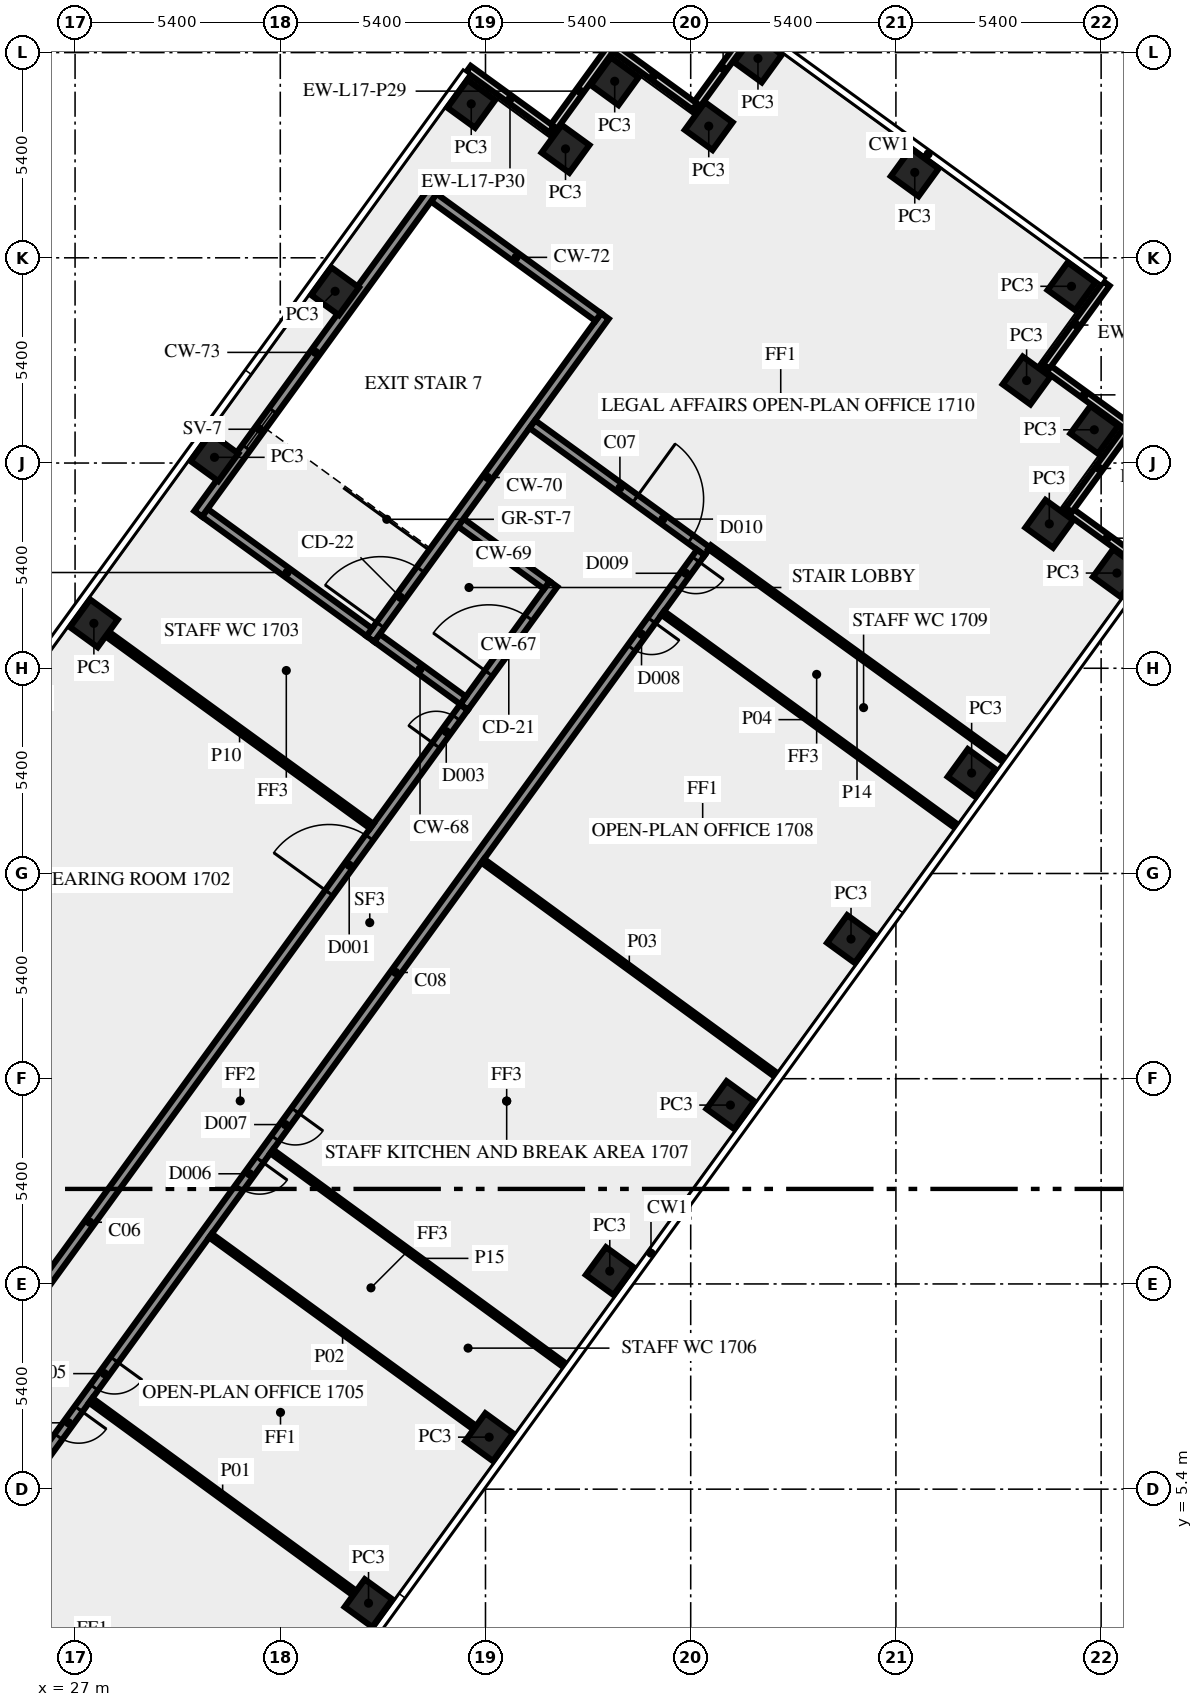
"""IFC4 building model, lengths in metres.
Left out: names, types, materials, properties, quantities, classifications, styles, units other than length and angle.
Written with IfcOpenShell. Run it as: python <this file> out.ifc"""

import sys

from ifc_helpers import new_model, si_unit, direction, frame, frame_2d, origin, origin_2d, place, context, subcontext, project, spatial, rectangle, extrude, element, fill, save


model = new_model("IFC4")
c1 = context("Model", 3, precision=1e-05, world=origin(), true_north=direction((0.0, 1.0)))
c2 = subcontext(c1, "Body", "Model", "MODEL_VIEW")
j1 = project(units=[si_unit("LENGTHUNIT", "METRE"), si_unit("PLANEANGLEUNIT", "RADIAN")], contexts=[c1])
p1 = place(None, origin())
s1 = spatial("IfcSite", under=j1, at=p1, CompositionType="ELEMENT")
p2 = place(p1, origin())
s2 = spatial("IfcBuilding", under=s1, at=p2, CompositionType="ELEMENT")
p3 = place(p2, frame((0.0, 0.0, 75.0)))
s3 = spatial("IfcBuildingStorey", under=s2, at=p3, CompositionType="ELEMENT", Elevation=75.0)
for number, where, z_axis, x_axis in (
    (1, (34.722, 2.4, 0.0), (0.0, 0.0, 1.0), (0.588, 0.809, 0.0)),
    (2, (37.896, 6.769, 0.0), (0.0, 0.0, 1.0), (0.588, 0.809, 0.0)),
    (3, (41.07, 11.137, 0.0), (0.0, 0.0, 1.0), (0.588, 0.809, 0.0)),
    (4, (44.244, 15.506, 0.0), (0.0, 0.0, 1.0), (0.588, 0.809, 0.0)),
    (5, (47.418, 19.875, 0.0), (0.0, 0.0, 1.0), (0.588, 0.809, 0.0)),
    (6, (50.592, 24.243, 0.0), (0.0, 0.0, 1.0), (0.588, 0.809, 0.0)),
    (7, (54.415, 29.505, 0.0), (0.0, 0.0, 1.0), (0.588, 0.809, 0.0)),
    (8, (52.636, 30.8, 0.0), (0.0, 0.0, 1.0), (-0.809, 0.588, 0.0)),
    (9, (53.82, 33.275, 0.0), (0.0, 0.0, 1.0), (-0.809, 0.588, 0.0)),
    (10, (52.039, 34.571, 0.0), (0.0, 0.0, 1.0), (0.588, 0.809, 0.0)),
    (11, (53.22, 37.05, 0.0), (0.0, 0.0, 1.0), (-0.809, 0.588, 0.0)),
    (12, (49.096, 40.047, 0.0), (0.0, 0.0, 1.0), (-0.809, 0.588, 0.0)),
    (13, (44.97, 43.045, 0.0), (0.0, 0.0, 1.0), (-0.809, 0.588, 0.0)),
    (14, (43.675, 41.265, 0.0), (0.0, 0.0, 1.0), (-0.809, 0.588, 0.0)),
    (15, (41.2, 42.445, 0.0), (0.0, 0.0, 1.0), (-0.588, -0.809, 0.0)),
    (16, (39.906, 40.666, 0.0), (0.0, 0.0, 1.0), (-0.588, -0.809, 0.0)),
    (17, (37.425, 41.85, 0.0), (0.0, 0.0, 1.0), (-0.588, -0.809, 0.0)),
    (18, (33.843, 36.919, 0.0), (0.0, 0.0, 1.0), (-0.588, -0.809, 0.0)),
    (19, (30.669, 32.55, 0.0), (0.0, 0.0, 1.0), (-0.588, -0.809, 0.0)),
    (20, (27.495, 28.181, 0.0), (0.0, 0.0, 1.0), (-0.588, -0.809, 0.0)),
):
    element("IfcColumn", number, at=place(p3, frame(where, z_axis=z_axis, x_axis=x_axis)), inside=s3, PredefinedType="COLUMN", context=c2, shape_type="SweptSolid", body=[
        extrude(rectangle(XDim=0.9, YDim=0.9, at=origin_2d()), origin(), (0.0, 0.0, 1.0), 3.4),
    ])
p4 = place(p3, frame((55.247, 29.629, 0.0), z_axis=(0.0, 0.0, 1.0), x_axis=(-0.809033161865, 0.587762999008, 0.0)))
e21 = element("IfcWall", 21, at=p4, inside=s3, PredefinedType="SOLIDWALL", context=c2, shape_type="SweptSolid", body=[
    extrude(rectangle(XDim=2.7, YDim=0.2, at=frame_2d((1.35, 0.0))), origin(), (0.0, 0.0, 1.0), 3.4),
])
p5 = place(p3, frame((53.151, 31.167, 0.0), z_axis=(0.0, 0.0, 1.0), x_axis=(0.587779184282, 0.809021403008, 0.0)))
e22 = element("IfcWall", 22, at=p5, inside=s3, PredefinedType="SOLIDWALL", context=c2, shape_type="SweptSolid", body=[
    extrude(rectangle(XDim=2.7, YDim=0.2, at=frame_2d((1.35, 0.0))), origin(), (0.0, 0.0, 1.0), 3.4),
])
for number, where, z_axis, x_axis in (
    (23, (54.65, 33.4, 0.0), (0.0, 0.0, 1.0), (-0.809, 0.588, 0.0)),
    (24, (52.553, 34.938, 0.0), (0.0, 0.0, 1.0), (0.588, 0.809, 0.0)),
    (25, (44.846, 43.875, 0.0), (0.0, 0.0, 1.0), (-0.588, -0.809, 0.0)),
    (26, (43.308, 41.779, 0.0), (0.0, 0.0, 1.0), (-0.809, 0.588, 0.0)),
):
    element("IfcWall", number, at=place(p3, frame(where, z_axis=z_axis, x_axis=x_axis)), inside=s3, PredefinedType="SOLIDWALL", context=c2, shape_type="SweptSolid", body=[
        extrude(rectangle(XDim=2.7, YDim=0.2, at=frame_2d((1.35, 0.0))), origin(), (0.0, 0.0, 1.0), 3.4),
    ])
p6 = place(p3, frame((41.075, 43.278, 0.0), z_axis=(0.0, 0.0, 1.0), x_axis=(-0.587806000234, -0.809001919707, 0.0)))
e27 = element("IfcWall", 27, at=p6, inside=s3, PredefinedType="SOLIDWALL", context=c2, shape_type="SweptSolid", body=[
    extrude(rectangle(XDim=2.7, YDim=0.2, at=frame_2d((1.35, 0.0))), origin(), (0.0, 0.0, 1.0), 3.4),
])
p7 = place(p3, frame((39.537, 41.181, 0.0), z_axis=(0.0, 0.0, 1.0), x_axis=(-0.809033161865, 0.587762999008, 0.0)))
e28 = element("IfcWall", 28, at=p7, inside=s3, PredefinedType="SOLIDWALL", context=c2, shape_type="SweptSolid", body=[
    extrude(rectangle(XDim=2.7, YDim=0.2, at=frame_2d((1.35, 0.0))), origin(), (0.0, 0.0, 1.0), 3.4),
])
p8 = place(p3, frame((37.238, 25.98, 0.0), z_axis=(0.0, 0.0, 1.0), x_axis=(0.587772420479, 0.809026317077, 0.0)))
e29 = element("IfcWall", 29, at=p8, inside=s3, PredefinedType="SHEAR", context=c2, shape_type="SweptSolid", body=[
    extrude(rectangle(XDim=4.0, YDim=0.25, at=frame_2d((2.0, 0.0))), origin(), (0.0, 0.0, 1.0), 3.4),
])
p9 = place(p8, frame((1.1, 0.0, 0.0)))
e30 = element("IfcOpeningElement", 30, at=p9, cuts=e29, PredefinedType="OPENING", context=c2, shape_type="SweptSolid", body=[
    extrude(rectangle(XDim=1.8, YDim=2.1, at=frame_2d((0.9, 1.05))), frame((0.0, 0.135, 0.0), z_axis=(0.0, -1.0, 0.0), x_axis=(1.0, 0.0, 0.0)), (0.0, 0.0, 1.0), 0.27),
])
for number, where, z_axis, x_axis in (
    (31, (37.21, 26.154, 0.0), (0.0, 0.0, 1.0), (-0.809, 0.588, 0.0)),
    (32, (39.414, 29.188, 0.0), (0.0, 0.0, 1.0), (-0.809, 0.588, 0.0)),
):
    element("IfcWall", number, at=place(p3, frame(where, z_axis=z_axis, x_axis=x_axis)), inside=s3, PredefinedType="SHEAR", context=c2, shape_type="SweptSolid", body=[
        extrude(rectangle(XDim=2.8, YDim=0.25, at=frame_2d((1.4, 0.0))), origin(), (0.0, 0.0, 1.0), 3.4),
    ])
p10 = place(p3, frame((34.77, 27.772, 0.0), z_axis=(0.0, 0.0, 1.0), x_axis=(0.587795589702, 0.809009483706, 0.0)))
e33 = element("IfcWall", 33, at=p10, inside=s3, PredefinedType="SHEAR", context=c2, shape_type="SweptSolid", body=[
    extrude(rectangle(XDim=10.5, YDim=0.25, at=frame_2d((5.25, 0.0))), origin(), (0.0, 0.0, 1.0), 3.4),
])
p11 = place(p10, frame((0.45, 0.0, 0.0)))
e34 = element("IfcOpeningElement", 34, at=p11, cuts=e33, PredefinedType="OPENING", context=c2, shape_type="SweptSolid", body=[
    extrude(rectangle(XDim=1.8, YDim=2.1, at=frame_2d((0.9, 1.05))), frame((0.0, 0.135, 0.0), z_axis=(0.0, -1.0, 0.0), x_axis=(1.0, 0.0, 0.0)), (0.0, 0.0, 1.0), 0.27),
])
p12 = place(p3, frame((34.742, 27.947, 0.0), z_axis=(0.0, 0.0, 1.0), x_axis=(-0.8089984606, 0.587810760999, 0.0)))
e35 = element("IfcWall", 35, at=p12, inside=s3, PredefinedType="SHEAR", context=c2, shape_type="SweptSolid", body=[
    extrude(rectangle(XDim=5.35, YDim=0.25, at=frame_2d((2.675, 0.0))), origin(), (0.0, 0.0, 1.0), 3.4),
])
p13 = place(p3, frame((40.767, 36.24, 0.0), z_axis=(0.0, 0.0, 1.0), x_axis=(-0.809020161303, 0.587780893365, 0.0)))
e36 = element("IfcWall", 36, at=p13, inside=s3, PredefinedType="SHEAR", context=c2, shape_type="SweptSolid", body=[
    extrude(rectangle(XDim=5.35, YDim=0.25, at=frame_2d((2.675, 0.0))), origin(), (0.0, 0.0, 1.0), 3.4),
])
p14 = place(p3, frame((30.24, 31.064, 0.0), z_axis=(0.0, 0.0, 1.0), x_axis=(0.587795589702, 0.809009483706, 0.0)))
e37 = element("IfcWall", 37, at=p14, inside=s3, PredefinedType="SHEAR", context=c2, shape_type="SweptSolid", body=[
    extrude(rectangle(XDim=10.5, YDim=0.25, at=frame_2d((5.25, 0.0))), origin(), (0.0, 0.0, 1.0), 3.4),
])
p15 = place(p14, frame((2.15, 0.0, 1.0)))
e38 = element("IfcOpeningElement", 38, at=p15, cuts=e37, PredefinedType="OPENING", context=c2, shape_type="SweptSolid", body=[
    extrude(rectangle(XDim=1.2, YDim=1.2, at=frame_2d((0.6, 0.6))), frame((0.0, 0.135, 0.0), z_axis=(0.0, -1.0, 0.0), x_axis=(1.0, 0.0, 0.0)), (0.0, 0.0, 1.0), 0.27),
])
p16 = place(p3, frame((17.545, -1.125, 0.0), z_axis=(0.0, 0.0, 1.0), x_axis=(0.587786323093, 0.809016216391, 0.0)))
e39 = element("IfcWall", 39, at=p16, inside=s3, PredefinedType="SOLIDWALL", context=c2, shape_type="SweptSolid", body=[
    extrude(rectangle(XDim=33.493, YDim=0.25, at=frame_2d((16.747, 0.0))), origin(), (0.0, 0.0, 1.0), 3.4),
])
p17 = place(p16, frame((27.458, 0.0, 0.0)))
e40 = element("IfcOpeningElement", 40, at=p17, cuts=e39, PredefinedType="OPENING", context=c2, shape_type="SweptSolid", body=[
    extrude(rectangle(XDim=1.8, YDim=2.1, at=frame_2d((0.9, 1.05))), frame((0.0, 0.135, 0.0), z_axis=(0.0, -1.0, 0.0), x_axis=(1.0, 0.0, 0.0)), (0.0, 0.0, 1.0), 0.27),
])
p18 = place(p16, frame((3.392, 0.0, 0.0)))
e41 = element("IfcOpeningElement", 41, at=p18, cuts=e39, PredefinedType="OPENING", context=c2, shape_type="SweptSolid", body=[
    extrude(rectangle(XDim=1.8, YDim=2.1, at=frame_2d((0.9, 1.05))), frame((0.0, 0.135, 0.0), z_axis=(0.0, -1.0, 0.0), x_axis=(1.0, 0.0, 0.0)), (0.0, 0.0, 1.0), 0.27),
])
p19 = place(p16, frame((32.253, 0.0, 0.0)))
e42 = element("IfcOpeningElement", 42, at=p19, cuts=e39, PredefinedType="OPENING", context=c2, shape_type="SweptSolid", body=[
    extrude(rectangle(XDim=0.9, YDim=2.1, at=frame_2d((0.45, 1.05))), frame((0.0, 0.135, 0.0), z_axis=(0.0, -1.0, 0.0), x_axis=(1.0, 0.0, 0.0)), (0.0, 0.0, 1.0), 0.27),
])
p20 = place(p3, frame((39.034, 33.42, 0.0), z_axis=(0.0, 0.0, 1.0), x_axis=(0.809023325802, -0.587776537732, 0.0)))
e43 = element("IfcWall", 43, at=p20, inside=s3, PredefinedType="SOLIDWALL", context=c2, shape_type="SweptSolid", body=[
    extrude(rectangle(XDim=5.695, YDim=0.25, at=frame_2d((2.848, 0.0))), origin(), (0.0, 0.0, 1.0), 3.4),
])
p21 = place(p20, frame((3.345, 0.0, 0.0)))
e44 = element("IfcOpeningElement", 44, at=p21, cuts=e43, PredefinedType="OPENING", context=c2, shape_type="SweptSolid", body=[
    extrude(rectangle(XDim=1.8, YDim=2.1, at=frame_2d((0.9, 1.05))), frame((0.0, 0.135, 0.0), z_axis=(0.0, -1.0, 0.0), x_axis=(1.0, 0.0, 0.0)), (0.0, 0.0, 1.0), 0.27),
])
p22 = place(p3, frame((43.467, 30.045, 0.0), z_axis=(0.0, 0.0, 1.0), x_axis=(-0.587784726077, -0.809017376692, 0.0)))
e45 = element("IfcWall", 45, at=p22, inside=s3, PredefinedType="SOLIDWALL", context=c2, shape_type="SweptSolid", body=[
    extrude(rectangle(XDim=39.02, YDim=0.25, at=frame_2d((19.51, 0.0))), origin(), (0.0, 0.0, 1.0), 3.4),
])
p23 = place(p22, frame((26.254, 0.0, 0.0)))
e46 = element("IfcOpeningElement", 46, at=p23, cuts=e45, PredefinedType="OPENING", context=c2, shape_type="SweptSolid", body=[
    extrude(rectangle(XDim=0.9, YDim=2.1, at=frame_2d((0.45, 1.05))), frame((0.0, 0.135, 0.0), z_axis=(0.0, -1.0, 0.0), x_axis=(1.0, 0.0, 0.0)), (0.0, 0.0, 1.0), 0.27),
])
p24 = place(p22, frame((2.205, 0.0, 0.0)))
e47 = element("IfcOpeningElement", 47, at=p24, cuts=e45, PredefinedType="OPENING", context=c2, shape_type="SweptSolid", body=[
    extrude(rectangle(XDim=0.9, YDim=2.1, at=frame_2d((0.45, 1.05))), frame((0.0, 0.135, 0.0), z_axis=(0.0, -1.0, 0.0), x_axis=(1.0, 0.0, 0.0)), (0.0, 0.0, 1.0), 0.27),
])
p25 = place(p22, frame((27.855, 0.0, 0.0)))
e48 = element("IfcOpeningElement", 48, at=p25, cuts=e45, PredefinedType="OPENING", context=c2, shape_type="SweptSolid", body=[
    extrude(rectangle(XDim=0.9, YDim=2.1, at=frame_2d((0.45, 1.05))), frame((0.0, 0.135, 0.0), z_axis=(0.0, -1.0, 0.0), x_axis=(1.0, 0.0, 0.0)), (0.0, 0.0, 1.0), 0.27),
])
p26 = place(p22, frame((18.155, 0.0, 0.0)))
e49 = element("IfcOpeningElement", 49, at=p26, cuts=e45, PredefinedType="OPENING", context=c2, shape_type="SweptSolid", body=[
    extrude(rectangle(XDim=0.9, YDim=2.1, at=frame_2d((0.45, 1.05))), frame((0.0, 0.135, 0.0), z_axis=(0.0, -1.0, 0.0), x_axis=(1.0, 0.0, 0.0)), (0.0, 0.0, 1.0), 0.27),
])
p27 = place(p22, frame((19.755, 0.0, 0.0)))
e50 = element("IfcOpeningElement", 50, at=p27, cuts=e45, PredefinedType="OPENING", context=c2, shape_type="SweptSolid", body=[
    extrude(rectangle(XDim=0.9, YDim=2.1, at=frame_2d((0.45, 1.05))), frame((0.0, 0.135, 0.0), z_axis=(0.0, -1.0, 0.0), x_axis=(1.0, 0.0, 0.0)), (0.0, 0.0, 1.0), 0.27),
])
p28 = place(p22, frame((0.224, 0.0, 0.0)))
e51 = element("IfcOpeningElement", 51, at=p28, cuts=e45, PredefinedType="OPENING", context=c2, shape_type="SweptSolid", body=[
    extrude(rectangle(XDim=0.9, YDim=2.1, at=frame_2d((0.45, 1.05))), frame((0.0, 0.135, 0.0), z_axis=(0.0, -1.0, 0.0), x_axis=(1.0, 0.0, 0.0)), (0.0, 0.0, 1.0), 0.27),
])
p29 = place(p3, frame((27.413, 7.735, 0.0), z_axis=(0.0, 0.0, 1.0), x_axis=(0.807664804385, -0.589641894507, 0.0)))
e52 = element("IfcWall", 52, at=p29, inside=s3, PredefinedType="PARTITIONING", context=c2, shape_type="SweptSolid", body=[
    extrude(rectangle(XDim=8.594, YDim=0.15, at=frame_2d((4.297, 0.0))), origin(), (0.0, 0.0, 1.0), 3.4),
])
p30 = place(p3, frame((37.516, 7.02, 0.0), z_axis=(0.0, 0.0, 1.0), x_axis=(-0.809002556908, 0.587805123248, 0.0)))
e53 = element("IfcWall", 53, at=p30, inside=s3, PredefinedType="PARTITIONING", context=c2, shape_type="SweptSolid", body=[
    extrude(rectangle(XDim=8.595, YDim=0.12, at=frame_2d((4.297, 0.0))), origin(), (0.0, 0.0, 1.0), 3.4),
])
p31 = place(p3, frame((37.728, 21.934, 0.0), z_axis=(0.0, 0.0, 1.0), x_axis=(0.807645841498, -0.589667868135, 0.0)))
e54 = element("IfcWall", 54, at=p31, inside=s3, PredefinedType="PARTITIONING", context=c2, shape_type="SweptSolid", body=[
    extrude(rectangle(XDim=9.551, YDim=0.12, at=frame_2d((4.775, 0.0))), origin(), (0.0, 0.0, 1.0), 2.5),
])
p32 = place(p3, frame((50.192, 22.841, 0.0), z_axis=(0.0, 0.0, 1.0), x_axis=(-0.809033337127, 0.587762757767, 0.0)))
e55 = element("IfcWall", 55, at=p32, inside=s3, PredefinedType="PARTITIONING", context=c2, shape_type="SweptSolid", body=[
    extrude(rectangle(XDim=9.551, YDim=0.12, at=frame_2d((4.775, 0.0))), origin(), (0.0, 0.0, 1.0), 2.5),
])
p33 = place(p3, frame((34.806, 22.845, 0.0), z_axis=(0.0, 0.0, 1.0), x_axis=(-0.809030728677, 0.587766348183, 0.0)))
e56 = element("IfcWall", 56, at=p33, inside=s3, PredefinedType="PARTITIONING", context=c2, shape_type="SweptSolid", body=[
    extrude(rectangle(XDim=8.596, YDim=0.15, at=frame_2d((4.298, 0.0))), origin(), (0.0, 0.0, 1.0), 3.4),
])
p34 = place(p3, frame((43.698, 30.185, 0.0), z_axis=(0.0, 0.0, 1.0), x_axis=(0.810419489461, -0.58585002441, 0.0)))
e57 = element("IfcWall", 57, at=p34, inside=s3, PredefinedType="PARTITIONING", context=c2, shape_type="SweptSolid", body=[
    extrude(rectangle(XDim=9.57, YDim=0.12, at=frame_2d((4.785, 0.0))), origin(), (0.0, 0.0, 1.0), 2.5),
])
p35 = place(p3, frame((32.174, 14.288, 0.0), z_axis=(0.0, 0.0, 1.0), x_axis=(0.807664588563, -0.589642190131, 0.0)))
e58 = element("IfcWall", 58, at=p35, inside=s3, PredefinedType="PARTITIONING", context=c2, shape_type="SweptSolid", body=[
    extrude(rectangle(XDim=9.55, YDim=0.12, at=frame_2d((4.775, 0.0))), origin(), (0.0, 0.0, 1.0), 2.5),
])
p36 = place(p9, origin())
e59 = element("IfcDoor", 59, at=p36, inside=s3, OperationType="DOUBLE_DOOR_SINGLE_SWING", PredefinedType="DOOR", context=c2, shape_type="SweptSolid", body=[
    extrude(rectangle(XDim=1.8, YDim=2.1, at=frame_2d((0.9, 1.05))), frame((0.0, 0.025, 0.0), z_axis=(0.0, -1.0, 0.0), x_axis=(1.0, 0.0, 0.0)), (0.0, 0.0, 1.0), 0.05),
])
fill(e30, e59)
p37 = place(p11, origin())
e60 = element("IfcDoor", 60, at=p37, inside=s3, OperationType="DOUBLE_DOOR_SINGLE_SWING", PredefinedType="DOOR", context=c2, shape_type="SweptSolid", body=[
    extrude(rectangle(XDim=1.8, YDim=2.1, at=frame_2d((0.9, 1.05))), frame((0.0, 0.025, 0.0), z_axis=(0.0, -1.0, 0.0), x_axis=(1.0, 0.0, 0.0)), (0.0, 0.0, 1.0), 0.05),
])
fill(e34, e60)
p38 = place(p15, origin())
e61 = element("IfcWindow", 61, at=p38, inside=s3, PartitioningType="SINGLE_PANEL", PredefinedType="WINDOW", context=c2, shape_type="SweptSolid", body=[
    extrude(rectangle(XDim=1.2, YDim=1.2, at=frame_2d((0.6, 0.6))), frame((0.0, 0.03, 0.0), z_axis=(0.0, -1.0, 0.0), x_axis=(1.0, 0.0, 0.0)), (0.0, 0.0, 1.0), 0.06),
])
fill(e38, e61)
p39 = place(p23, origin())
e62 = element("IfcDoor", 62, at=p39, inside=s3, OperationType="SINGLE_SWING_RIGHT", PredefinedType="DOOR", context=c2, shape_type="SweptSolid", body=[
    extrude(rectangle(XDim=0.9, YDim=2.1, at=frame_2d((0.45, 1.05))), frame((0.0, 0.025, 0.0), z_axis=(0.0, -1.0, 0.0), x_axis=(1.0, 0.0, 0.0)), (0.0, 0.0, 1.0), 0.05),
])
fill(e46, e62)
p40 = place(p24, origin())
e63 = element("IfcDoor", 63, at=p40, inside=s3, OperationType="SINGLE_SWING_LEFT", PredefinedType="DOOR", context=c2, shape_type="SweptSolid", body=[
    extrude(rectangle(XDim=0.9, YDim=2.1, at=frame_2d((0.45, 1.05))), frame((0.0, 0.025, 0.0), z_axis=(0.0, -1.0, 0.0), x_axis=(1.0, 0.0, 0.0)), (0.0, 0.0, 1.0), 0.05),
])
fill(e47, e63)
p41 = place(p17, origin())
e64 = element("IfcDoor", 64, at=p41, inside=s3, OperationType="DOUBLE_DOOR_SINGLE_SWING", PredefinedType="DOOR", context=c2, shape_type="SweptSolid", body=[
    extrude(rectangle(XDim=1.8, YDim=2.1, at=frame_2d((0.9, 1.05))), frame((0.0, 0.025, 0.0), z_axis=(0.0, -1.0, 0.0), x_axis=(1.0, 0.0, 0.0)), (0.0, 0.0, 1.0), 0.05),
])
fill(e40, e64)
p42 = place(p25, origin())
e65 = element("IfcDoor", 65, at=p42, inside=s3, OperationType="SINGLE_SWING_LEFT", PredefinedType="DOOR", context=c2, shape_type="SweptSolid", body=[
    extrude(rectangle(XDim=0.9, YDim=2.1, at=frame_2d((0.45, 1.05))), frame((0.0, 0.025, 0.0), z_axis=(0.0, -1.0, 0.0), x_axis=(1.0, 0.0, 0.0)), (0.0, 0.0, 1.0), 0.05),
])
fill(e48, e65)
p43 = place(p21, origin())
e66 = element("IfcDoor", 66, at=p43, inside=s3, OperationType="DOUBLE_DOOR_SINGLE_SWING", PredefinedType="DOOR", context=c2, shape_type="SweptSolid", body=[
    extrude(rectangle(XDim=1.8, YDim=2.1, at=frame_2d((0.9, 1.05))), frame((0.0, 0.025, 0.0), z_axis=(0.0, -1.0, 0.0), x_axis=(1.0, 0.0, 0.0)), (0.0, 0.0, 1.0), 0.05),
])
fill(e44, e66)
p44 = place(p26, origin())
e67 = element("IfcDoor", 67, at=p44, inside=s3, OperationType="SINGLE_SWING_RIGHT", PredefinedType="DOOR", context=c2, shape_type="SweptSolid", body=[
    extrude(rectangle(XDim=0.9, YDim=2.1, at=frame_2d((0.45, 1.05))), frame((0.0, 0.025, 0.0), z_axis=(0.0, -1.0, 0.0), x_axis=(1.0, 0.0, 0.0)), (0.0, 0.0, 1.0), 0.05),
])
fill(e49, e67)
p45 = place(p19, origin())
e68 = element("IfcDoor", 68, at=p45, inside=s3, OperationType="SINGLE_SWING_RIGHT", PredefinedType="DOOR", context=c2, shape_type="SweptSolid", body=[
    extrude(rectangle(XDim=0.9, YDim=2.1, at=frame_2d((0.45, 1.05))), frame((0.0, 0.025, 0.0), z_axis=(0.0, -1.0, 0.0), x_axis=(1.0, 0.0, 0.0)), (0.0, 0.0, 1.0), 0.05),
])
fill(e42, e68)
p46 = place(p27, origin())
e69 = element("IfcDoor", 69, at=p46, inside=s3, OperationType="SINGLE_SWING_LEFT", PredefinedType="DOOR", context=c2, shape_type="SweptSolid", body=[
    extrude(rectangle(XDim=0.9, YDim=2.1, at=frame_2d((0.45, 1.05))), frame((0.0, 0.025, 0.0), z_axis=(0.0, -1.0, 0.0), x_axis=(1.0, 0.0, 0.0)), (0.0, 0.0, 1.0), 0.05),
])
fill(e50, e69)
p47 = place(p28, origin())
e70 = element("IfcDoor", 70, at=p47, inside=s3, OperationType="SINGLE_SWING_LEFT", PredefinedType="DOOR", context=c2, shape_type="SweptSolid", body=[
    extrude(rectangle(XDim=0.9, YDim=2.1, at=frame_2d((0.45, 1.05))), frame((0.0, 0.025, 0.0), z_axis=(0.0, -1.0, 0.0), x_axis=(1.0, 0.0, 0.0)), (0.0, 0.0, 1.0), 0.05),
])
fill(e51, e70)
save(model, sys.argv[1])
